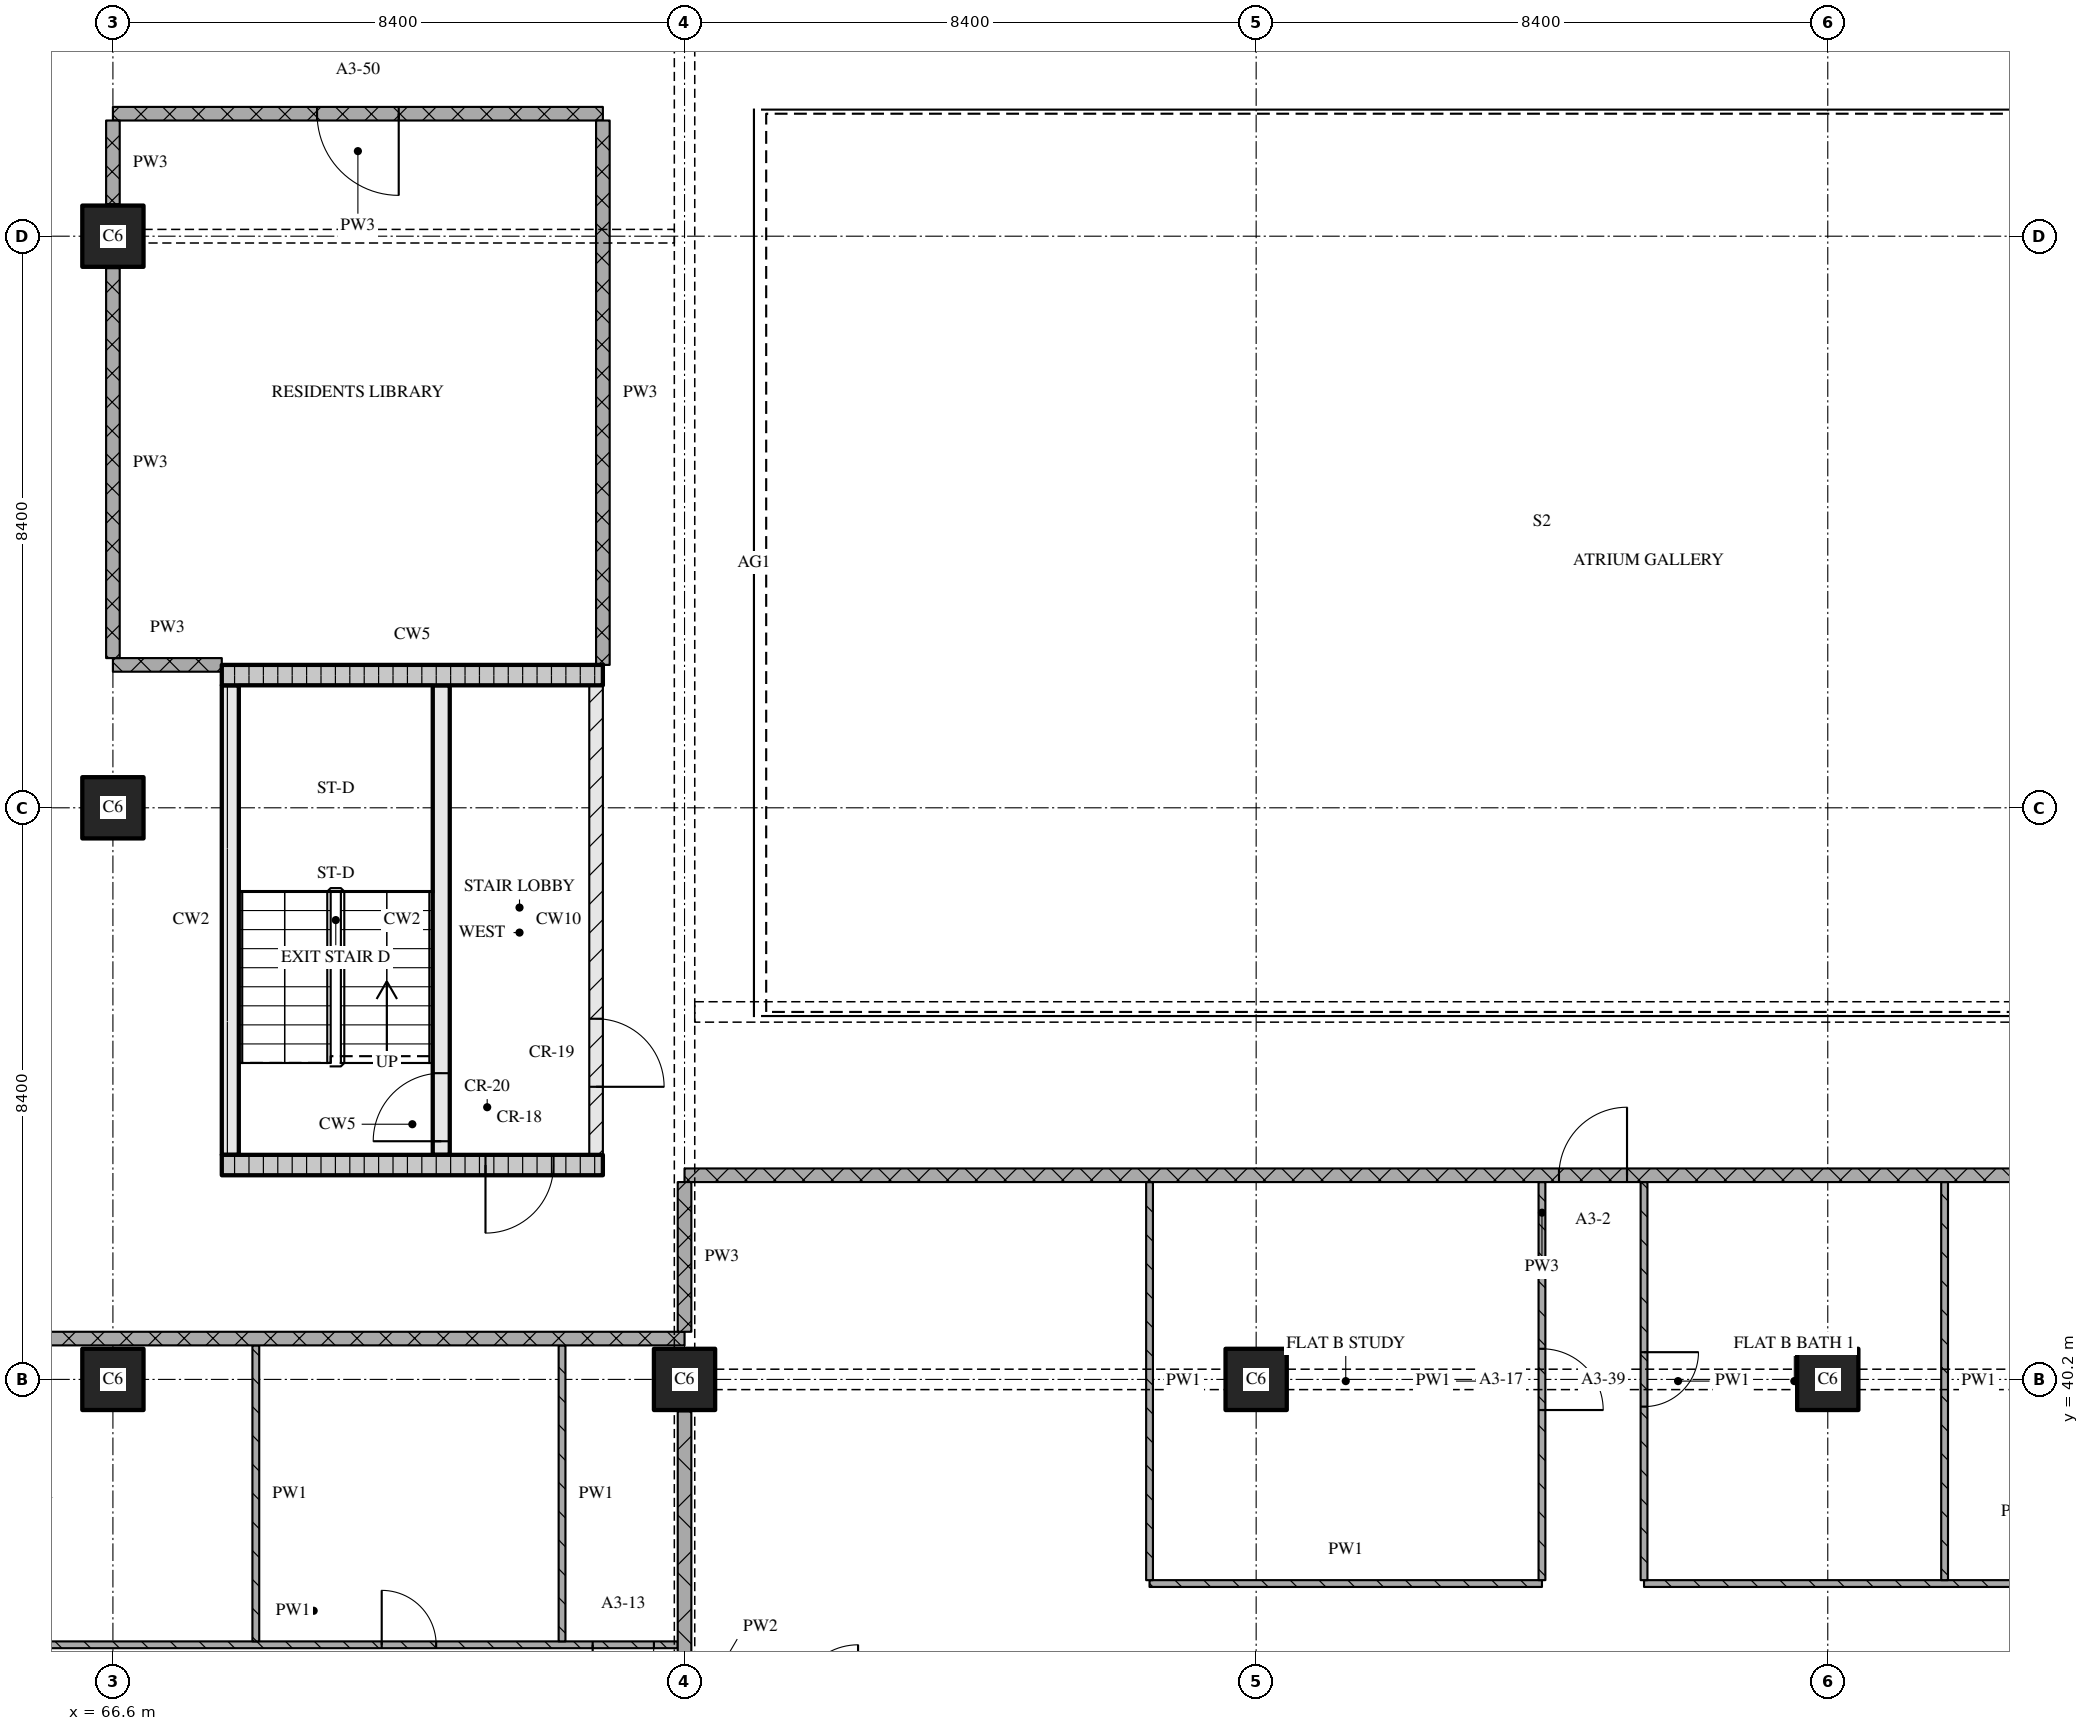
"""IFC4 building model, lengths in metres.
Left out: names, types, materials, properties, quantities, classifications, styles, units other than length and angle.
Written with IfcOpenShell. Run it as: python <this file> out.ifc"""

import sys

from ifc_helpers import new_model, si_unit, direction, frame, frame_2d, origin, origin_2d, place, context, subcontext, project, spatial, rectangle, extrude, element, fill, save


model = new_model("IFC4")
c1 = context("Model", 3, precision=1e-05, world=origin(), true_north=direction((0.0, 1.0)))
c2 = subcontext(c1, "Body", "Model", "MODEL_VIEW")
j1 = project(units=[si_unit("LENGTHUNIT", "METRE"), si_unit("PLANEANGLEUNIT", "RADIAN")], contexts=[c1])
p1 = place(None, origin())
s1 = spatial("IfcSite", under=j1, at=p1, CompositionType="ELEMENT")
p2 = place(p1, origin())
s2 = spatial("IfcBuilding", under=s1, at=p2, CompositionType="ELEMENT")
p3 = place(p2, frame((0.0, 0.0, 66.0)))
s3 = spatial("IfcBuildingStorey", under=s2, at=p3, CompositionType="ELEMENT", Elevation=66.0)
for number, where, z_axis, x_axis in (
    (1, (66.6, 40.2, 0.0), (0.0, 0.0, 1.0), (1.0, 0.0, 0.0)),
    (2, (66.6, 48.6, 0.0), (0.0, 0.0, 1.0), (1.0, 0.0, 0.0)),
    (3, (66.6, 57.0, 0.0), (0.0, 0.0, 1.0), (1.0, 0.0, 0.0)),
    (4, (75.0, 40.2, 0.0), (0.0, 0.0, 1.0), (1.0, 0.0, 0.0)),
    (5, (83.4, 40.2, 0.0), (0.0, 0.0, 1.0), (1.0, 0.0, 0.0)),
    (6, (91.8, 40.2, 0.0), (0.0, 0.0, 1.0), (1.0, 0.0, 0.0)),
):
    element("IfcColumn", number, at=place(p3, frame(where, z_axis=z_axis, x_axis=x_axis)), inside=s3, PredefinedType="COLUMN", context=c2, shape_type="SweptSolid", body=[
        extrude(rectangle(XDim=0.9, YDim=0.9, at=origin_2d()), origin(), (0.0, 0.0, 1.0), 3.6),
    ])
p4 = place(p3, frame((68.2, 43.35, 0.0), z_axis=(0.0, 0.0, 1.0), x_axis=(1.0, 0.0, 0.0)))
e7 = element("IfcWall", 7, at=p4, inside=s3, PredefinedType="SOLIDWALL", context=c2, shape_type="SweptSolid", body=[
    extrude(rectangle(XDim=5.6, YDim=0.3, at=frame_2d((2.8, 0.0))), origin(), (0.0, 0.0, 1.0), 3.32),
])
p5 = place(p4, frame((3.875, 0.0, 0.0)))
e8 = element("IfcOpeningElement", 8, at=p5, cuts=e7, PredefinedType="OPENING", context=c2, shape_type="SweptSolid", body=[
    extrude(rectangle(XDim=1.0, YDim=2.1, at=frame_2d((0.5, 1.05))), frame((0.0, 0.16, 0.0), z_axis=(0.0, -1.0, 0.0), x_axis=(1.0, 0.0, 0.0)), (0.0, 0.0, 1.0), 0.32),
])
p6 = place(p3, frame((68.325, 43.5, 0.0), z_axis=(0.0, 0.0, 1.0), x_axis=(0.0, 1.0, 0.0)))
e9 = element("IfcWall", 9, at=p6, inside=s3, PredefinedType="SOLIDWALL", context=c2, shape_type="SweptSolid", body=[
    extrude(rectangle(XDim=6.9, YDim=0.25, at=frame_2d((3.45, 0.0))), origin(), (0.0, 0.0, 1.0), 3.32),
])
p7 = place(p3, frame((71.425, 43.5, 0.0), z_axis=(0.0, 0.0, 1.0), x_axis=(0.0, 1.0, 0.0)))
e10 = element("IfcWall", 10, at=p7, inside=s3, PredefinedType="SOLIDWALL", context=c2, shape_type="SweptSolid", body=[
    extrude(rectangle(XDim=6.9, YDim=0.25, at=frame_2d((3.45, 0.0))), origin(), (0.0, 0.0, 1.0), 3.32),
])
p8 = place(p7, frame((0.2, 0.0, 0.0)))
e11 = element("IfcOpeningElement", 11, at=p8, cuts=e10, PredefinedType="OPENING", context=c2, shape_type="SweptSolid", body=[
    extrude(rectangle(XDim=1.0, YDim=2.1, at=frame_2d((0.5, 1.05))), frame((0.0, 0.135, 0.0), z_axis=(0.0, -1.0, 0.0), x_axis=(1.0, 0.0, 0.0)), (0.0, 0.0, 1.0), 0.27),
])
p9 = place(p3, frame((73.7, 43.5, 0.0), z_axis=(0.0, 0.0, 1.0), x_axis=(0.0, 1.0, 0.0)))
e12 = element("IfcWall", 12, at=p9, inside=s3, PredefinedType="PARTITIONING", context=c2, shape_type="SweptSolid", body=[
    extrude(rectangle(XDim=6.9, YDim=0.2, at=frame_2d((3.45, 0.0))), origin(), (0.0, 0.0, 1.0), 3.32),
])
p10 = place(p9, frame((1.0, 0.0, 0.0)))
e13 = element("IfcOpeningElement", 13, at=p10, cuts=e12, PredefinedType="OPENING", context=c2, shape_type="SweptSolid", body=[
    extrude(rectangle(XDim=1.0, YDim=2.1, at=frame_2d((0.5, 1.05))), frame((0.0, 0.11, 0.0), z_axis=(0.0, -1.0, 0.0), x_axis=(1.0, 0.0, 0.0)), (0.0, 0.0, 1.0), 0.22),
])
p11 = place(p3, frame((68.2, 50.55, 0.0), z_axis=(0.0, 0.0, 1.0), x_axis=(1.0, 0.0, 0.0)))
e14 = element("IfcWall", 14, at=p11, inside=s3, PredefinedType="SOLIDWALL", context=c2, shape_type="SweptSolid", body=[
    extrude(rectangle(XDim=5.6, YDim=0.3, at=frame_2d((2.8, 0.0))), origin(), (0.0, 0.0, 1.0), 3.32),
])
p12 = place(p3, frame((64.2, 36.3, 0.0), z_axis=(0.0, 0.0, 1.0), x_axis=(1.0, 0.0, 0.0)))
e15 = element("IfcWall", 15, at=p12, inside=s3, PredefinedType="PARTITIONING", context=c2, shape_type="SweptSolid", body=[
    extrude(rectangle(XDim=10.7, YDim=0.1, at=frame_2d((5.35, 0.0))), origin(), (0.0, 0.0, 1.0), 3.32),
])
p13 = place(p12, frame((6.35, 0.0, 0.0)))
e16 = element("IfcOpeningElement", 16, at=p13, cuts=e15, PredefinedType="OPENING", context=c2, shape_type="SweptSolid", body=[
    extrude(rectangle(XDim=0.8, YDim=2.1, at=frame_2d((0.4, 1.05))), frame((0.0, 0.06, 0.0), z_axis=(0.0, -1.0, 0.0), x_axis=(1.0, 0.0, 0.0)), (0.0, 0.0, 1.0), 0.12),
])
p14 = place(p12, frame((9.45, 0.0, 0.0)))
e17 = element("IfcOpeningElement", 17, at=p14, cuts=e15, PredefinedType="OPENING", context=c2, shape_type="SweptSolid", body=[
    extrude(rectangle(XDim=0.9, YDim=2.1, at=frame_2d((0.45, 1.05))), frame((0.0, 0.06, 0.0), z_axis=(0.0, -1.0, 0.0), x_axis=(1.0, 0.0, 0.0)), (0.0, 0.0, 1.0), 0.12),
])
p15 = place(p3, frame((81.833, 37.2, 0.0), z_axis=(0.0, 0.0, 1.0), x_axis=(1.0, 0.0, 0.0)))
e18 = element("IfcWall", 18, at=p15, inside=s3, PredefinedType="PARTITIONING", context=c2, shape_type="SweptSolid", body=[
    extrude(rectangle(XDim=5.767, YDim=0.1, at=frame_2d((2.883, 0.0))), origin(), (0.0, 0.0, 1.0), 3.32),
])
p16 = place(p3, frame((89.1, 37.2, 0.0), z_axis=(0.0, 0.0, 1.0), x_axis=(1.0, 0.0, 0.0)))
e19 = element("IfcWall", 19, at=p16, inside=s3, PredefinedType="PARTITIONING", context=c2, shape_type="SweptSolid", body=[
    extrude(rectangle(XDim=11.0, YDim=0.1, at=frame_2d((5.5, 0.0))), origin(), (0.0, 0.0, 1.0), 3.32),
])
p17 = place(p16, frame((6.225, 0.0, 0.0)))
e20 = element("IfcOpeningElement", 20, at=p17, cuts=e19, PredefinedType="OPENING", context=c2, shape_type="SweptSolid", body=[
    extrude(rectangle(XDim=0.8, YDim=2.1, at=frame_2d((0.4, 1.05))), frame((0.0, 0.06, 0.0), z_axis=(0.0, -1.0, 0.0), x_axis=(1.0, 0.0, 0.0)), (0.0, 0.0, 1.0), 0.12),
])
p18 = place(p16, frame((9.517, 0.0, 0.0)))
e21 = element("IfcOpeningElement", 21, at=p18, cuts=e19, PredefinedType="OPENING", context=c2, shape_type="SweptSolid", body=[
    extrude(rectangle(XDim=0.9, YDim=2.1, at=frame_2d((0.45, 1.05))), frame((0.0, 0.06, 0.0), z_axis=(0.0, -1.0, 0.0), x_axis=(1.0, 0.0, 0.0)), (0.0, 0.0, 1.0), 0.12),
])
p19 = place(p3, frame((75.0, 40.8, 0.0), z_axis=(0.0, 0.0, 1.0), x_axis=(-1.0, 0.0, 0.0)))
e22 = element("IfcWall", 22, at=p19, inside=s3, PredefinedType="PARTITIONING", context=c2, shape_type="SweptSolid", body=[
    extrude(rectangle(XDim=24.08, YDim=0.2, at=frame_2d((12.04, 0.0))), origin(), (0.0, 0.0, 1.0), 3.32),
])
p20 = place(p19, frame((11.05, 0.0, 0.0)))
e23 = element("IfcOpeningElement", 23, at=p20, cuts=e22, PredefinedType="OPENING", context=c2, shape_type="SweptSolid", body=[
    extrude(rectangle(XDim=1.0, YDim=2.1, at=frame_2d((0.5, 1.05))), frame((0.0, 0.11, 0.0), z_axis=(0.0, -1.0, 0.0), x_axis=(1.0, 0.0, 0.0)), (0.0, 0.0, 1.0), 0.22),
])
p21 = place(p3, frame((100.2, 43.2, 0.0), z_axis=(0.0, 0.0, 1.0), x_axis=(-1.0, 0.0, 0.0)))
e24 = element("IfcWall", 24, at=p21, inside=s3, PredefinedType="PARTITIONING", context=c2, shape_type="SweptSolid", body=[
    extrude(rectangle(XDim=25.2, YDim=0.2, at=frame_2d((12.6, 0.0))), origin(), (0.0, 0.0, 1.0), 3.32),
])
p22 = place(p21, frame((11.35, 0.0, 0.0)))
e25 = element("IfcOpeningElement", 25, at=p22, cuts=e24, PredefinedType="OPENING", context=c2, shape_type="SweptSolid", body=[
    extrude(rectangle(XDim=1.0, YDim=2.1, at=frame_2d((0.5, 1.05))), frame((0.0, 0.11, 0.0), z_axis=(0.0, -1.0, 0.0), x_axis=(1.0, 0.0, 0.0)), (0.0, 0.0, 1.0), 0.22),
])
p23 = place(p3, frame((66.6, 50.7, 0.0), z_axis=(0.0, 0.0, 1.0), x_axis=(1.0, 0.0, 0.0)))
e26 = element("IfcWall", 26, at=p23, inside=s3, PredefinedType="PARTITIONING", context=c2, shape_type="SweptSolid", body=[
    extrude(rectangle(XDim=1.6, YDim=0.2, at=frame_2d((0.8, 0.0))), origin(), (0.0, 0.0, 1.0), 3.32),
])
p24 = place(p3, frame((73.8, 58.8, 0.0), z_axis=(0.0, 0.0, 1.0), x_axis=(-1.0, 0.0, 0.0)))
e27 = element("IfcWall", 27, at=p24, inside=s3, PredefinedType="PARTITIONING", context=c2, shape_type="SweptSolid", body=[
    extrude(rectangle(XDim=7.2, YDim=0.2, at=frame_2d((3.6, 0.0))), origin(), (0.0, 0.0, 1.0), 3.32),
])
p25 = place(p24, frame((3.0, 0.0, 0.0)))
e28 = element("IfcOpeningElement", 28, at=p25, cuts=e27, PredefinedType="OPENING", context=c2, shape_type="SweptSolid", body=[
    extrude(rectangle(XDim=1.2, YDim=2.1, at=frame_2d((0.6, 1.05))), frame((0.0, 0.11, 0.0), z_axis=(0.0, -1.0, 0.0), x_axis=(1.0, 0.0, 0.0)), (0.0, 0.0, 1.0), 0.22),
])
p26 = place(p3, frame((66.6, 56.53, 0.0), z_axis=(0.0, 0.0, 1.0), x_axis=(0.0, -1.0, 0.0)))
e29 = element("IfcWall", 29, at=p26, inside=s3, PredefinedType="PARTITIONING", context=c2, shape_type="SweptSolid", body=[
    extrude(rectangle(XDim=5.73, YDim=0.2, at=frame_2d((2.865, 0.0))), origin(), (0.0, 0.0, 1.0), 3.32),
])
p27 = place(p3, frame((66.6, 58.7, 0.0), z_axis=(0.0, 0.0, 1.0), x_axis=(0.0, -1.0, 0.0)))
e30 = element("IfcWall", 30, at=p27, inside=s3, PredefinedType="PARTITIONING", context=c2, shape_type="SweptSolid", body=[
    extrude(rectangle(XDim=1.23, YDim=0.2, at=frame_2d((0.615, 0.0))), origin(), (0.0, 0.0, 1.0), 3.32),
])
for number, where, z_axis, x_axis in (
    (31, (68.7, 40.7, 0.0), (0.0, 0.0, 1.0), (0.0, -1.0, 0.0)),
    (32, (73.2, 40.7, 0.0), (0.0, 0.0, 1.0), (0.0, -1.0, 0.0)),
):
    element("IfcWall", number, at=place(p3, frame(where, z_axis=z_axis, x_axis=x_axis)), inside=s3, PredefinedType="PARTITIONING", context=c2, shape_type="SweptSolid", body=[
        extrude(rectangle(XDim=4.35, YDim=0.1, at=frame_2d((2.175, 0.0))), origin(), (0.0, 0.0, 1.0), 3.32),
    ])
p28 = place(p3, frame((73.8, 58.7, 0.0), z_axis=(0.0, 0.0, 1.0), x_axis=(0.0, -1.0, 0.0)))
e33 = element("IfcWall", 33, at=p28, inside=s3, PredefinedType="PARTITIONING", context=c2, shape_type="SweptSolid", body=[
    extrude(rectangle(XDim=8.0, YDim=0.2, at=frame_2d((4.0, 0.0))), origin(), (0.0, 0.0, 1.0), 3.32),
])
p29 = place(p3, frame((75.0, 43.1, 0.0), z_axis=(0.0, 0.0, 1.0), x_axis=(0.0, -1.0, 0.0)))
e34 = element("IfcWall", 34, at=p29, inside=s3, PredefinedType="PARTITIONING", context=c2, shape_type="SweptSolid", body=[
    extrude(rectangle(XDim=2.2, YDim=0.2, at=frame_2d((1.1, 0.0))), origin(), (0.0, 0.0, 1.0), 2.43),
])
p30 = place(p3, frame((75.0, 39.73, 0.0), z_axis=(0.0, 0.0, 1.0), x_axis=(0.0, -1.0, 0.0)))
e35 = element("IfcWall", 35, at=p30, inside=s3, PredefinedType="PARTITIONING", context=c2, shape_type="SweptSolid", body=[
    extrude(rectangle(XDim=7.46, YDim=0.2, at=frame_2d((3.73, 0.0))), origin(), (0.0, 0.0, 1.0), 2.83),
])
p31 = place(p3, frame((81.833, 43.1, 0.0), z_axis=(0.0, 0.0, 1.0), x_axis=(0.0, -1.0, 0.0)))
e36 = element("IfcWall", 36, at=p31, inside=s3, PredefinedType="PARTITIONING", context=c2, shape_type="SweptSolid", body=[
    extrude(rectangle(XDim=5.85, YDim=0.1, at=frame_2d((2.925, 0.0))), origin(), (0.0, 0.0, 1.0), 3.32),
])
p32 = place(p3, frame((87.6, 37.25, 0.0), z_axis=(0.0, 0.0, 1.0), x_axis=(0.0, 1.0, 0.0)))
e37 = element("IfcWall", 37, at=p32, inside=s3, PredefinedType="PARTITIONING", context=c2, shape_type="SweptSolid", body=[
    extrude(rectangle(XDim=5.85, YDim=0.1, at=frame_2d((2.925, 0.0))), origin(), (0.0, 0.0, 1.0), 3.32),
])
p33 = place(p32, frame((2.5, 0.0, 0.0)))
e38 = element("IfcOpeningElement", 38, at=p33, cuts=e37, PredefinedType="OPENING", context=c2, shape_type="SweptSolid", body=[
    extrude(rectangle(XDim=0.9, YDim=2.1, at=frame_2d((0.45, 1.05))), frame((0.0, 0.06, 0.0), z_axis=(0.0, -1.0, 0.0), x_axis=(1.0, 0.0, 0.0)), (0.0, 0.0, 1.0), 0.12),
])
p34 = place(p3, frame((89.1, 43.1, 0.0), z_axis=(0.0, 0.0, 1.0), x_axis=(0.0, -1.0, 0.0)))
e39 = element("IfcWall", 39, at=p34, inside=s3, PredefinedType="PARTITIONING", context=c2, shape_type="SweptSolid", body=[
    extrude(rectangle(XDim=5.85, YDim=0.1, at=frame_2d((2.925, 0.0))), origin(), (0.0, 0.0, 1.0), 3.32),
])
p35 = place(p34, frame((2.5, 0.0, 0.0)))
e40 = element("IfcOpeningElement", 40, at=p35, cuts=e39, PredefinedType="OPENING", context=c2, shape_type="SweptSolid", body=[
    extrude(rectangle(XDim=0.8, YDim=2.1, at=frame_2d((0.4, 1.05))), frame((0.0, 0.06, 0.0), z_axis=(0.0, -1.0, 0.0), x_axis=(1.0, 0.0, 0.0)), (0.0, 0.0, 1.0), 0.12),
])
p36 = place(p3, frame((93.517, 43.1, 0.0), z_axis=(0.0, 0.0, 1.0), x_axis=(0.0, -1.0, 0.0)))
e41 = element("IfcWall", 41, at=p36, inside=s3, PredefinedType="PARTITIONING", context=c2, shape_type="SweptSolid", body=[
    extrude(rectangle(XDim=5.85, YDim=0.1, at=frame_2d((2.925, 0.0))), origin(), (0.0, 0.0, 1.0), 3.32),
])
p37 = place(p5, origin())
e42 = element("IfcDoor", 42, at=p37, inside=s3, OperationType="SINGLE_SWING_RIGHT", PredefinedType="DOOR", context=c2, shape_type="SweptSolid", body=[
    extrude(rectangle(XDim=1.0, YDim=2.1, at=frame_2d((0.5, 1.05))), frame((0.0, 0.025, 0.0), z_axis=(0.0, -1.0, 0.0), x_axis=(1.0, 0.0, 0.0)), (0.0, 0.0, 1.0), 0.05),
])
fill(e8, e42)
p38 = place(p8, origin())
e43 = element("IfcDoor", 43, at=p38, inside=s3, OperationType="SINGLE_SWING_LEFT", PredefinedType="DOOR", context=c2, shape_type="SweptSolid", body=[
    extrude(rectangle(XDim=1.0, YDim=2.1, at=frame_2d((0.5, 1.05))), frame((0.0, 0.025, 0.0), z_axis=(0.0, -1.0, 0.0), x_axis=(1.0, 0.0, 0.0)), (0.0, 0.0, 1.0), 0.05),
])
fill(e11, e43)
p39 = place(p10, origin())
e44 = element("IfcDoor", 44, at=p39, inside=s3, OperationType="SINGLE_SWING_RIGHT", PredefinedType="DOOR", context=c2, shape_type="SweptSolid", body=[
    extrude(rectangle(XDim=1.0, YDim=2.1, at=frame_2d((0.5, 1.05))), frame((0.0, 0.025, 0.0), z_axis=(0.0, -1.0, 0.0), x_axis=(1.0, 0.0, 0.0)), (0.0, 0.0, 1.0), 0.05),
])
fill(e13, e44)
p40 = place(p13, origin())
e45 = element("IfcDoor", 45, at=p40, inside=s3, OperationType="SINGLE_SWING_LEFT", PredefinedType="DOOR", context=c2, shape_type="SweptSolid", body=[
    extrude(rectangle(XDim=0.8, YDim=2.1, at=frame_2d((0.4, 1.05))), frame((0.0, 0.025, 0.0), z_axis=(0.0, -1.0, 0.0), x_axis=(1.0, 0.0, 0.0)), (0.0, 0.0, 1.0), 0.05),
])
fill(e16, e45)
p41 = place(p14, origin())
e46 = element("IfcDoor", 46, at=p41, inside=s3, OperationType="SINGLE_SWING_RIGHT", PredefinedType="DOOR", context=c2, shape_type="SweptSolid", body=[
    extrude(rectangle(XDim=0.9, YDim=2.1, at=frame_2d((0.45, 1.05))), frame((0.0, 0.025, 0.0), z_axis=(0.0, -1.0, 0.0), x_axis=(1.0, 0.0, 0.0)), (0.0, 0.0, 1.0), 0.05),
])
fill(e17, e46)
p42 = place(p22, origin())
e47 = element("IfcDoor", 47, at=p42, inside=s3, OperationType="SINGLE_SWING_RIGHT", PredefinedType="DOOR", context=c2, shape_type="SweptSolid", body=[
    extrude(rectangle(XDim=1.0, YDim=2.1, at=frame_2d((0.5, 1.05))), frame((0.0, 0.025, 0.0), z_axis=(0.0, -1.0, 0.0), x_axis=(1.0, 0.0, 0.0)), (0.0, 0.0, 1.0), 0.05),
])
fill(e25, e47)
p43 = place(p25, origin())
e48 = element("IfcDoor", 48, at=p43, inside=s3, OperationType="SINGLE_SWING_LEFT", PredefinedType="DOOR", context=c2, shape_type="SweptSolid", body=[
    extrude(rectangle(XDim=1.2, YDim=2.1, at=frame_2d((0.6, 1.05))), frame((0.0, 0.025, 0.0), z_axis=(0.0, -1.0, 0.0), x_axis=(1.0, 0.0, 0.0)), (0.0, 0.0, 1.0), 0.05),
])
fill(e28, e48)
p44 = place(p33, origin())
e49 = element("IfcDoor", 49, at=p44, inside=s3, OperationType="SINGLE_SWING_RIGHT", PredefinedType="DOOR", context=c2, shape_type="SweptSolid", body=[
    extrude(rectangle(XDim=0.9, YDim=2.1, at=frame_2d((0.45, 1.05))), frame((0.0, 0.025, 0.0), z_axis=(0.0, -1.0, 0.0), x_axis=(1.0, 0.0, 0.0)), (0.0, 0.0, 1.0), 0.05),
])
fill(e38, e49)
p45 = place(p35, origin())
e50 = element("IfcDoor", 50, at=p45, inside=s3, OperationType="SINGLE_SWING_LEFT", PredefinedType="DOOR", context=c2, shape_type="SweptSolid", body=[
    extrude(rectangle(XDim=0.8, YDim=2.1, at=frame_2d((0.4, 1.05))), frame((0.0, 0.025, 0.0), z_axis=(0.0, -1.0, 0.0), x_axis=(1.0, 0.0, 0.0)), (0.0, 0.0, 1.0), 0.05),
])
fill(e40, e50)
save(model, sys.argv[1])
